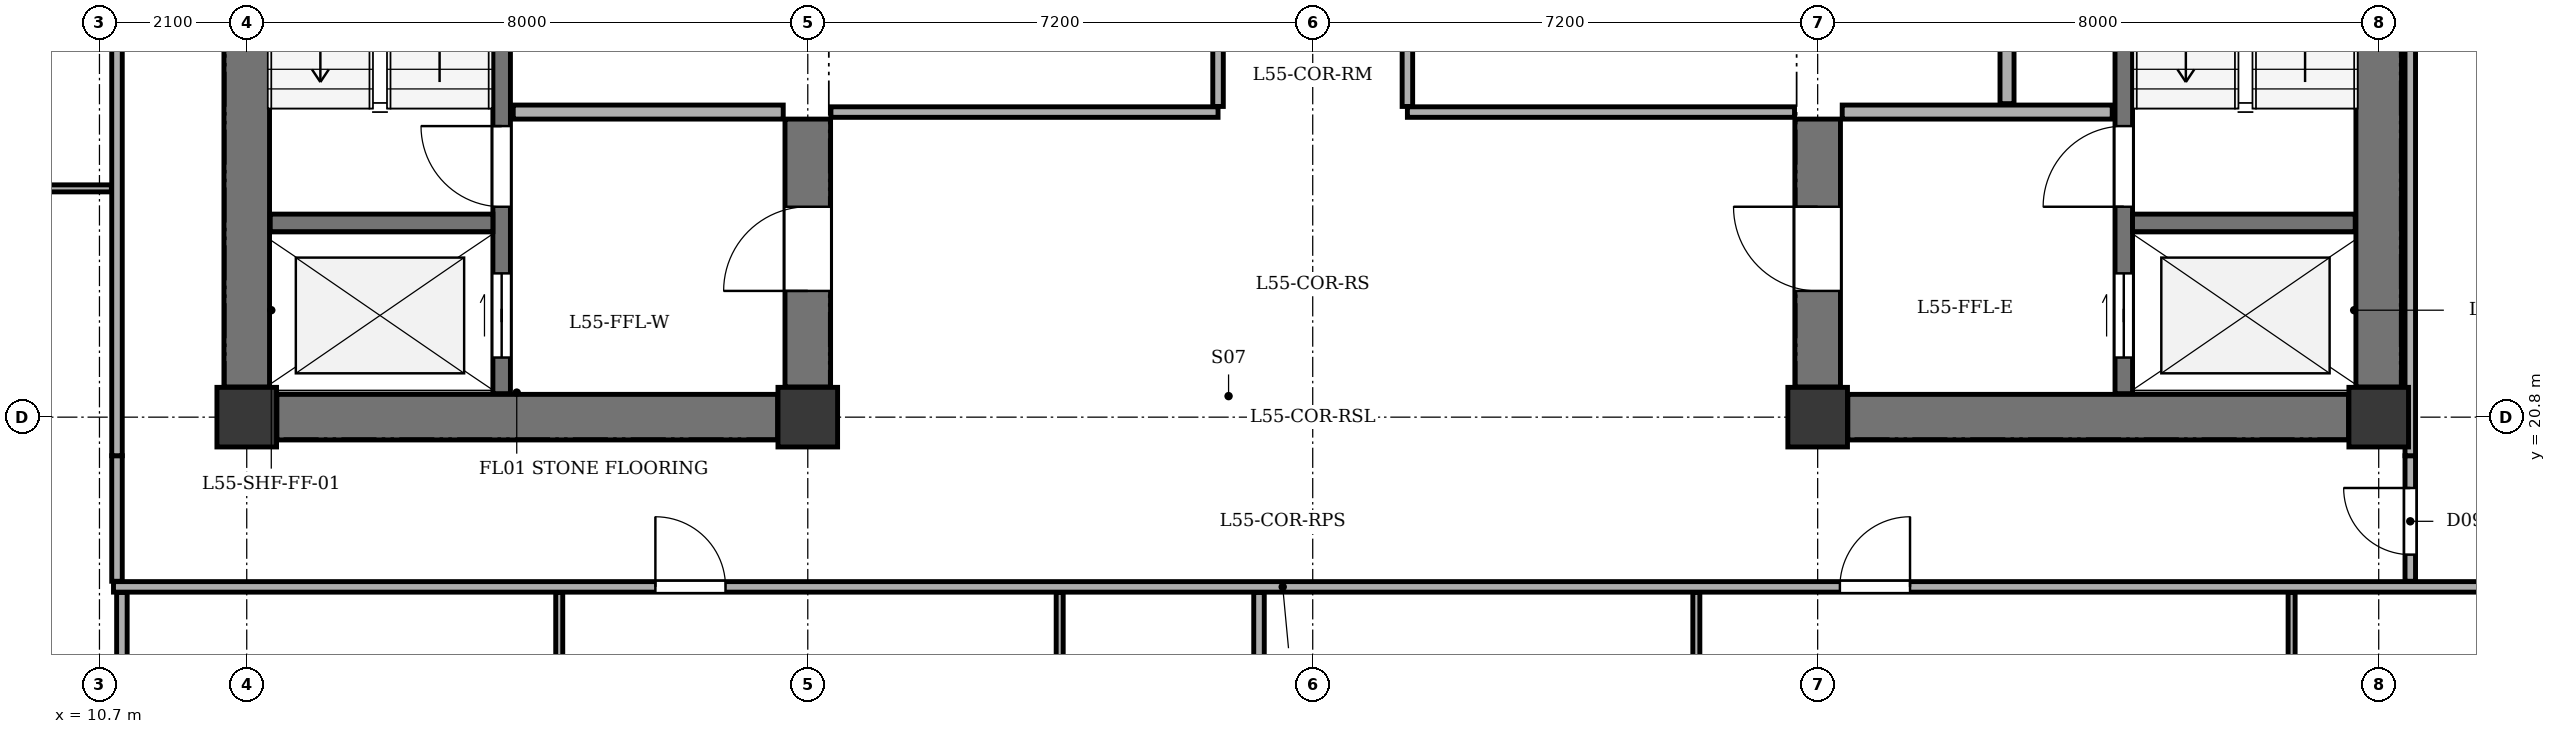
"""IFC4 building model, lengths in metres.
Left out: names, types, materials, properties, quantities, classifications, styles, units other than length and angle.
Written with IfcOpenShell. Run it as: python <this file> out.ifc"""

import sys

from ifc_helpers import new_model, si_unit, direction, frame, frame_2d, origin, origin_2d, place, context, subcontext, project, spatial, rectangle, extrude, element, fill, save


model = new_model("IFC4")
c1 = context("Model", 3, precision=1e-05, world=origin(), true_north=direction((0.0, 1.0)))
c2 = subcontext(c1, "Body", "Model", "MODEL_VIEW")
j1 = project(units=[si_unit("LENGTHUNIT", "METRE"), si_unit("PLANEANGLEUNIT", "RADIAN")], contexts=[c1])
p1 = place(None, origin())
s1 = spatial("IfcSite", under=j1, at=p1, CompositionType="ELEMENT")
p2 = place(p1, origin())
s2 = spatial("IfcBuilding", under=s1, at=p2, CompositionType="ELEMENT")
p3 = place(p2, frame((0.0, 0.0, 214.3)))
s3 = spatial("IfcBuildingStorey", under=s2, at=p3, CompositionType="ELEMENT", Elevation=214.3)
for number, where, z_axis, x_axis in (
    (1, (12.8, 20.8, 0.0), (0.0, 0.0, 1.0), (1.0, 0.0, 0.0)),
    (2, (20.8, 20.8, 0.0), (0.0, 0.0, 1.0), (1.0, 0.0, 0.0)),
    (3, (35.2, 20.8, 0.0), (0.0, 0.0, 1.0), (1.0, 0.0, 0.0)),
    (4, (43.2, 20.8, 0.0), (0.0, 0.0, 1.0), (1.0, 0.0, 0.0)),
):
    element("IfcColumn", number, at=place(p3, frame(where, z_axis=z_axis, x_axis=x_axis)), inside=s3, PredefinedType="COLUMN", context=c2, shape_type="SweptSolid", body=[
        extrude(rectangle(XDim=0.85, YDim=0.85, at=origin_2d()), origin(), (0.0, 0.0, 1.0), 3.4),
    ])
p4 = place(p3, frame((12.8, 21.23, 0.0), z_axis=(0.0, 0.0, 1.0), x_axis=(0.0, 1.0, 0.0)))
e5 = element("IfcWall", 5, at=p4, inside=s3, PredefinedType="SHEAR", context=c2, shape_type="SweptSolid", body=[
    extrude(rectangle(XDim=11.94, YDim=0.65, at=frame_2d((5.97, 0.0))), origin(), (0.0, 0.0, 1.0), 3.1),
])
p5 = place(p3, frame((13.23, 20.8, 0.0), z_axis=(0.0, 0.0, 1.0), x_axis=(1.0, 0.0, 0.0)))
e6 = element("IfcWall", 6, at=p5, inside=s3, PredefinedType="SHEAR", context=c2, shape_type="SweptSolid", body=[
    extrude(rectangle(XDim=7.14, YDim=0.65, at=frame_2d((3.57, 0.0))), origin(), (0.0, 0.0, 1.0), 3.1),
])
p6 = place(p3, frame((20.8, 21.23, 0.0), z_axis=(0.0, 0.0, 1.0), x_axis=(0.0, 1.0, 0.0)))
e7 = element("IfcWall", 7, at=p6, inside=s3, PredefinedType="SHEAR", context=c2, shape_type="SweptSolid", body=[
    extrude(rectangle(XDim=3.82, YDim=0.65, at=frame_2d((1.91, 0.0))), origin(), (0.0, 0.0, 1.0), 3.1),
])
p7 = place(p6, frame((1.37, 0.0, 0.0)))
e8 = element("IfcOpeningElement", 8, at=p7, cuts=e7, PredefinedType="OPENING", context=c2, shape_type="SweptSolid", body=[
    extrude(rectangle(XDim=1.2, YDim=2.15, at=frame_2d((0.6, 1.075))), frame((0.0, 0.335, 0.0), z_axis=(0.0, -1.0, 0.0), x_axis=(1.0, 0.0, 0.0)), (0.0, 0.0, 1.0), 0.67),
])
p8 = place(p3, frame((16.435, 21.135, 0.0), z_axis=(0.0, 0.0, 1.0), x_axis=(0.0, 1.0, 0.0)))
e9 = element("IfcWall", 9, at=p8, inside=s3, PredefinedType="SHEAR", context=c2, shape_type="SweptSolid", body=[
    extrude(rectangle(XDim=12.13, YDim=0.25, at=frame_2d((6.065, 0.0))), origin(), (0.0, 0.0, 1.0), 3.1),
])
p9 = place(p8, frame((0.515, 0.0, 0.0)))
e10 = element("IfcOpeningElement", 10, at=p9, cuts=e9, PredefinedType="OPENING", context=c2, shape_type="SweptSolid", body=[
    extrude(rectangle(XDim=1.2, YDim=2.15, at=frame_2d((0.6, 1.075))), frame((0.0, 0.135, 0.0), z_axis=(0.0, -1.0, 0.0), x_axis=(1.0, 0.0, 0.0)), (0.0, 0.0, 1.0), 0.27),
])
p10 = place(p8, frame((2.665, 0.0, 0.0)))
e11 = element("IfcOpeningElement", 11, at=p10, cuts=e9, PredefinedType="OPENING", context=c2, shape_type="SweptSolid", body=[
    extrude(rectangle(XDim=1.15, YDim=2.15, at=frame_2d((0.575, 1.075))), frame((0.0, 0.135, 0.0), z_axis=(0.0, -1.0, 0.0), x_axis=(1.0, 0.0, 0.0)), (0.0, 0.0, 1.0), 0.27),
])
p11 = place(p3, frame((13.135, 23.57, 0.0), z_axis=(0.0, 0.0, 1.0), x_axis=(1.0, 0.0, 0.0)))
e12 = element("IfcWall", 12, at=p11, inside=s3, PredefinedType="SHEAR", context=c2, shape_type="SweptSolid", body=[
    extrude(rectangle(XDim=3.175, YDim=0.25, at=frame_2d((1.587, 0.0))), origin(), (0.0, 0.0, 1.0), 3.1),
])
p12 = place(p3, frame((16.6, 25.15, 0.0), z_axis=(0.0, 0.0, 1.0), x_axis=(1.0, 0.0, 0.0)))
e13 = element("IfcWall", 13, at=p12, inside=s3, PredefinedType="SOLIDWALL", context=c2, shape_type="SweptSolid", body=[
    extrude(rectangle(XDim=3.85, YDim=0.2, at=frame_2d((1.925, 0.0))), origin(), (0.0, 0.0, 1.0), 3.1),
])
p13 = place(p3, frame((43.2, 21.23, 0.0), z_axis=(0.0, 0.0, 1.0), x_axis=(0.0, 1.0, 0.0)))
e14 = element("IfcWall", 14, at=p13, inside=s3, PredefinedType="SHEAR", context=c2, shape_type="SweptSolid", body=[
    extrude(rectangle(XDim=11.94, YDim=0.65, at=frame_2d((5.97, 0.0))), origin(), (0.0, 0.0, 1.0), 3.1),
])
p14 = place(p3, frame((35.63, 20.8, 0.0), z_axis=(0.0, 0.0, 1.0), x_axis=(1.0, 0.0, 0.0)))
e15 = element("IfcWall", 15, at=p14, inside=s3, PredefinedType="SHEAR", context=c2, shape_type="SweptSolid", body=[
    extrude(rectangle(XDim=7.14, YDim=0.65, at=frame_2d((3.57, 0.0))), origin(), (0.0, 0.0, 1.0), 3.1),
])
p15 = place(p3, frame((35.2, 21.23, 0.0), z_axis=(0.0, 0.0, 1.0), x_axis=(0.0, 1.0, 0.0)))
e16 = element("IfcWall", 16, at=p15, inside=s3, PredefinedType="SHEAR", context=c2, shape_type="SweptSolid", body=[
    extrude(rectangle(XDim=3.82, YDim=0.65, at=frame_2d((1.91, 0.0))), origin(), (0.0, 0.0, 1.0), 3.1),
])
p16 = place(p15, frame((1.37, 0.0, 0.0)))
e17 = element("IfcOpeningElement", 17, at=p16, cuts=e16, PredefinedType="OPENING", context=c2, shape_type="SweptSolid", body=[
    extrude(rectangle(XDim=1.2, YDim=2.15, at=frame_2d((0.6, 1.075))), frame((0.0, 0.335, 0.0), z_axis=(0.0, -1.0, 0.0), x_axis=(1.0, 0.0, 0.0)), (0.0, 0.0, 1.0), 0.67),
])
p17 = place(p3, frame((39.565, 21.135, 0.0), z_axis=(0.0, 0.0, 1.0), x_axis=(0.0, 1.0, 0.0)))
e18 = element("IfcWall", 18, at=p17, inside=s3, PredefinedType="SHEAR", context=c2, shape_type="SweptSolid", body=[
    extrude(rectangle(XDim=12.13, YDim=0.25, at=frame_2d((6.065, 0.0))), origin(), (0.0, 0.0, 1.0), 3.1),
])
p18 = place(p17, frame((0.515, 0.0, 0.0)))
e19 = element("IfcOpeningElement", 19, at=p18, cuts=e18, PredefinedType="OPENING", context=c2, shape_type="SweptSolid", body=[
    extrude(rectangle(XDim=1.2, YDim=2.15, at=frame_2d((0.6, 1.075))), frame((0.0, 0.135, 0.0), z_axis=(0.0, -1.0, 0.0), x_axis=(1.0, 0.0, 0.0)), (0.0, 0.0, 1.0), 0.27),
])
p19 = place(p17, frame((2.665, 0.0, 0.0)))
e20 = element("IfcOpeningElement", 20, at=p19, cuts=e18, PredefinedType="OPENING", context=c2, shape_type="SweptSolid", body=[
    extrude(rectangle(XDim=1.15, YDim=2.15, at=frame_2d((0.575, 1.075))), frame((0.0, 0.135, 0.0), z_axis=(0.0, -1.0, 0.0), x_axis=(1.0, 0.0, 0.0)), (0.0, 0.0, 1.0), 0.27),
])
p20 = place(p3, frame((39.69, 23.57, 0.0), z_axis=(0.0, 0.0, 1.0), x_axis=(1.0, 0.0, 0.0)))
e21 = element("IfcWall", 21, at=p20, inside=s3, PredefinedType="SHEAR", context=c2, shape_type="SweptSolid", body=[
    extrude(rectangle(XDim=3.175, YDim=0.25, at=frame_2d((1.587, 0.0))), origin(), (0.0, 0.0, 1.0), 3.1),
])
p21 = place(p3, frame((35.55, 25.15, 0.0), z_axis=(0.0, 0.0, 1.0), x_axis=(1.0, 0.0, 0.0)))
e22 = element("IfcWall", 22, at=p21, inside=s3, PredefinedType="SOLIDWALL", context=c2, shape_type="SweptSolid", body=[
    extrude(rectangle(XDim=3.85, YDim=0.2, at=frame_2d((1.925, 0.0))), origin(), (0.0, 0.0, 1.0), 3.1),
])
p22 = place(p3, frame((37.9, 25.27, 0.0), z_axis=(0.0, 0.0, 1.0), x_axis=(0.0, 1.0, 0.0)))
e23 = element("IfcWall", 23, at=p22, inside=s3, PredefinedType="SOLIDWALL", context=c2, shape_type="SweptSolid", body=[
    extrude(rectangle(XDim=7.995, YDim=0.2, at=frame_2d((3.998, 0.0))), origin(), (0.0, 0.0, 1.0), 3.1),
])
for number, where, z_axis, x_axis in (
    (24, (21.13, 25.15, 0.0), (0.0, 0.0, 1.0), (1.0, 0.0, 0.0)),
    (25, (29.35, 25.15, 0.0), (0.0, 0.0, 1.0), (1.0, 0.0, 0.0)),
):
    element("IfcWall", number, at=place(p3, frame(where, z_axis=z_axis, x_axis=x_axis)), inside=s3, PredefinedType="PARTITIONING", context=c2, shape_type="SweptSolid", body=[
        extrude(rectangle(XDim=5.52, YDim=0.15, at=frame_2d((2.76, 0.0))), origin(), (0.0, 0.0, 1.0), 3.1),
    ])
p23 = place(p3, frame((26.65, 25.23, 0.0), z_axis=(0.0, 0.0, 1.0), x_axis=(0.0, 1.0, 0.0)))
e26 = element("IfcWall", 26, at=p23, inside=s3, PredefinedType="PARTITIONING", context=c2, shape_type="SweptSolid", body=[
    extrude(rectangle(XDim=5.82, YDim=0.15, at=frame_2d((2.91, 0.0))), origin(), (0.0, 0.0, 1.0), 3.1),
])
p24 = place(p23, frame((2.72, 0.0, 0.0)))
e27 = element("IfcOpeningElement", 27, at=p24, cuts=e26, PredefinedType="OPENING", context=c2, shape_type="SweptSolid", body=[
    extrude(rectangle(XDim=1.0, YDim=2.1, at=frame_2d((0.5, 1.05))), frame((0.0, 0.085, 0.0), z_axis=(0.0, -1.0, 0.0), x_axis=(1.0, 0.0, 0.0)), (0.0, 0.0, 1.0), 0.17),
])
p25 = place(p3, frame((29.35, 25.23, 0.0), z_axis=(0.0, 0.0, 1.0), x_axis=(0.0, 1.0, 0.0)))
e28 = element("IfcWall", 28, at=p25, inside=s3, PredefinedType="PARTITIONING", context=c2, shape_type="SweptSolid", body=[
    extrude(rectangle(XDim=5.82, YDim=0.15, at=frame_2d((2.91, 0.0))), origin(), (0.0, 0.0, 1.0), 3.1),
])
p26 = place(p25, frame((2.72, 0.0, 0.0)))
e29 = element("IfcOpeningElement", 29, at=p26, cuts=e28, PredefinedType="OPENING", context=c2, shape_type="SweptSolid", body=[
    extrude(rectangle(XDim=1.0, YDim=2.1, at=frame_2d((0.5, 1.05))), frame((0.0, 0.085, 0.0), z_axis=(0.0, -1.0, 0.0), x_axis=(1.0, 0.0, 0.0)), (0.0, 0.0, 1.0), 0.17),
])
p27 = place(p3, frame((10.9, 18.38, 0.0), z_axis=(0.0, 0.0, 1.0), x_axis=(1.0, 0.0, 0.0)))
e30 = element("IfcWall", 30, at=p27, inside=s3, PredefinedType="PARTITIONING", context=c2, shape_type="SweptSolid", body=[
    extrude(rectangle(XDim=34.02, YDim=0.15, at=frame_2d((17.01, 0.0))), origin(), (0.0, 0.0, 1.0), 3.1),
])
p28 = place(p27, frame((7.727, 0.0, 0.0)))
e31 = element("IfcOpeningElement", 31, at=p28, cuts=e30, PredefinedType="OPENING", context=c2, shape_type="SweptSolid", body=[
    extrude(rectangle(XDim=1.0, YDim=2.1, at=frame_2d((0.5, 1.05))), frame((0.0, 0.085, 0.0), z_axis=(0.0, -1.0, 0.0), x_axis=(1.0, 0.0, 0.0)), (0.0, 0.0, 1.0), 0.17),
])
p29 = place(p27, frame((24.617, 0.0, 0.0)))
e32 = element("IfcOpeningElement", 32, at=p29, cuts=e30, PredefinedType="OPENING", context=c2, shape_type="SweptSolid", body=[
    extrude(rectangle(XDim=1.0, YDim=2.1, at=frame_2d((0.5, 1.05))), frame((0.0, 0.085, 0.0), z_axis=(0.0, -1.0, 0.0), x_axis=(1.0, 0.0, 0.0)), (0.0, 0.0, 1.0), 0.17),
])
p30 = place(p3, frame((11.02, 3.045, 0.0), z_axis=(0.0, 0.0, 1.0), x_axis=(0.0, 1.0, 0.0)))
e33 = element("IfcWall", 33, at=p30, inside=s3, PredefinedType="PARTITIONING", context=c2, shape_type="SweptSolid", body=[
    extrude(rectangle(XDim=15.255, YDim=0.15, at=frame_2d((7.627, 0.0))), origin(), (0.0, 0.0, 1.0), 3.1),
])
p31 = place(p3, frame((24.392, 5.605, 0.0), z_axis=(0.0, 0.0, 1.0), x_axis=(0.0, 1.0, 0.0)))
e34 = element("IfcWall", 34, at=p31, inside=s3, PredefinedType="PARTITIONING", context=c2, shape_type="SweptSolid", body=[
    extrude(rectangle(XDim=12.695, YDim=0.1, at=frame_2d((6.348, 0.0))), origin(), (0.0, 0.0, 1.0), 3.1),
])
p32 = place(p31, frame((5.91, 0.0, 0.0)))
e35 = element("IfcOpeningElement", 35, at=p32, cuts=e34, PredefinedType="OPENING", context=c2, shape_type="SweptSolid", body=[
    extrude(rectangle(XDim=0.9, YDim=2.05, at=frame_2d((0.45, 1.025))), frame((0.0, 0.06, 0.0), z_axis=(0.0, -1.0, 0.0), x_axis=(1.0, 0.0, 0.0)), (0.0, 0.0, 1.0), 0.12),
])
p33 = place(p3, frame((17.256, 5.605, 0.0), z_axis=(0.0, 0.0, 1.0), x_axis=(0.0, 1.0, 0.0)))
e36 = element("IfcWall", 36, at=p33, inside=s3, PredefinedType="PARTITIONING", context=c2, shape_type="SweptSolid", body=[
    extrude(rectangle(XDim=12.695, YDim=0.1, at=frame_2d((6.348, 0.0))), origin(), (0.0, 0.0, 1.0), 3.1),
])
p34 = place(p33, frame((0.605, 0.0, 0.0)))
e37 = element("IfcOpeningElement", 37, at=p34, cuts=e36, PredefinedType="OPENING", context=c2, shape_type="SweptSolid", body=[
    extrude(rectangle(XDim=0.9, YDim=2.05, at=frame_2d((0.45, 1.025))), frame((0.0, 0.06, 0.0), z_axis=(0.0, -1.0, 0.0), x_axis=(1.0, 0.0, 0.0)), (0.0, 0.0, 1.0), 0.12),
])
p35 = place(p3, frame((27.234, 3.045, 0.0), z_axis=(0.0, 0.0, 1.0), x_axis=(0.0, 1.0, 0.0)))
e38 = element("IfcWall", 38, at=p35, inside=s3, PredefinedType="PARTITIONING", context=c2, shape_type="SweptSolid", body=[
    extrude(rectangle(XDim=15.255, YDim=0.15, at=frame_2d((7.627, 0.0))), origin(), (0.0, 0.0, 1.0), 3.1),
])
p36 = place(p3, frame((41.958, 5.605, 0.0), z_axis=(0.0, 0.0, 1.0), x_axis=(0.0, 1.0, 0.0)))
e39 = element("IfcWall", 39, at=p36, inside=s3, PredefinedType="PARTITIONING", context=c2, shape_type="SweptSolid", body=[
    extrude(rectangle(XDim=12.695, YDim=0.1, at=frame_2d((6.348, 0.0))), origin(), (0.0, 0.0, 1.0), 2.725),
])
p37 = place(p36, frame((5.91, 0.0, 0.0)))
e40 = element("IfcOpeningElement", 40, at=p37, cuts=e39, PredefinedType="OPENING", context=c2, shape_type="SweptSolid", body=[
    extrude(rectangle(XDim=0.9, YDim=2.05, at=frame_2d((0.45, 1.025))), frame((0.0, 0.06, 0.0), z_axis=(0.0, -1.0, 0.0), x_axis=(1.0, 0.0, 0.0)), (0.0, 0.0, 1.0), 0.12),
])
p38 = place(p3, frame((33.47, 5.605, 0.0), z_axis=(0.0, 0.0, 1.0), x_axis=(0.0, 1.0, 0.0)))
e41 = element("IfcWall", 41, at=p38, inside=s3, PredefinedType="PARTITIONING", context=c2, shape_type="SweptSolid", body=[
    extrude(rectangle(XDim=12.695, YDim=0.1, at=frame_2d((6.348, 0.0))), origin(), (0.0, 0.0, 1.0), 2.725),
])
p39 = place(p38, frame((0.605, 0.0, 0.0)))
e42 = element("IfcOpeningElement", 42, at=p39, cuts=e41, PredefinedType="OPENING", context=c2, shape_type="SweptSolid", body=[
    extrude(rectangle(XDim=0.9, YDim=2.05, at=frame_2d((0.45, 1.025))), frame((0.0, 0.06, 0.0), z_axis=(0.0, -1.0, 0.0), x_axis=(1.0, 0.0, 0.0)), (0.0, 0.0, 1.0), 0.12),
])
p40 = place(p3, frame((10.95, 18.46, 0.0), z_axis=(0.0, 0.0, 1.0), x_axis=(0.0, 1.0, 0.0)))
e43 = element("IfcWall", 43, at=p40, inside=s3, PredefinedType="PARTITIONING", context=c2, shape_type="SweptSolid", body=[
    extrude(rectangle(XDim=1.79, YDim=0.15, at=frame_2d((0.895, 0.0))), origin(), (0.0, 0.0, 1.0), 3.1),
])
p41 = place(p3, frame((10.95, 20.25, 0.0), z_axis=(0.0, 0.0, 1.0), x_axis=(0.0, 1.0, 0.0)))
e44 = element("IfcWall", 44, at=p41, inside=s3, PredefinedType="PARTITIONING", context=c2, shape_type="SweptSolid", body=[
    extrude(rectangle(XDim=13.9, YDim=0.15, at=frame_2d((6.95, 0.0))), origin(), (0.0, 0.0, 1.0), 3.1),
])
p42 = place(p3, frame((4.645, 24.062, 0.0), z_axis=(0.0, 0.0, 1.0), x_axis=(1.0, 0.0, 0.0)))
e45 = element("IfcWall", 45, at=p42, inside=s3, PredefinedType="PARTITIONING", context=c2, shape_type="SweptSolid", body=[
    extrude(rectangle(XDim=6.225, YDim=0.1, at=frame_2d((3.113, 0.0))), origin(), (0.0, 0.0, 1.0), 3.1),
])
p43 = place(p42, frame((2.696, 0.0, 0.0)))
e46 = element("IfcOpeningElement", 46, at=p43, cuts=e45, PredefinedType="OPENING", context=c2, shape_type="SweptSolid", body=[
    extrude(rectangle(XDim=0.9, YDim=2.05, at=frame_2d((0.45, 1.025))), frame((0.0, 0.06, 0.0), z_axis=(0.0, -1.0, 0.0), x_axis=(1.0, 0.0, 0.0)), (0.0, 0.0, 1.0), 0.12),
])
p44 = place(p3, frame((43.65, 18.46, 0.0), z_axis=(0.0, 0.0, 1.0), x_axis=(0.0, 1.0, 0.0)))
e47 = element("IfcWall", 47, at=p44, inside=s3, PredefinedType="PARTITIONING", context=c2, shape_type="SweptSolid", body=[
    extrude(rectangle(XDim=1.79, YDim=0.15, at=frame_2d((0.895, 0.0))), origin(), (0.0, 0.0, 1.0), 3.1),
])
p45 = place(p44, frame((0.38, 0.0, 0.0)))
e48 = element("IfcOpeningElement", 48, at=p45, cuts=e47, PredefinedType="OPENING", context=c2, shape_type="SweptSolid", body=[
    extrude(rectangle(XDim=0.95, YDim=2.1, at=frame_2d((0.475, 1.05))), frame((0.0, 0.085, 0.0), z_axis=(0.0, -1.0, 0.0), x_axis=(1.0, 0.0, 0.0)), (0.0, 0.0, 1.0), 0.17),
])
p46 = place(p3, frame((43.65, 20.25, 0.0), z_axis=(0.0, 0.0, 1.0), x_axis=(0.0, 1.0, 0.0)))
e49 = element("IfcWall", 49, at=p46, inside=s3, PredefinedType="PARTITIONING", context=c2, shape_type="SweptSolid", body=[
    extrude(rectangle(XDim=13.27, YDim=0.15, at=frame_2d((6.635, 0.0))), origin(), (0.0, 0.0, 1.0), 3.1),
])
p47 = place(p7, origin())
e50 = element("IfcDoor", 50, at=p47, inside=s3, OperationType="SINGLE_SWING_LEFT", PredefinedType="DOOR", context=c2, shape_type="SweptSolid", body=[
    extrude(rectangle(XDim=1.2, YDim=2.15, at=frame_2d((0.6, 1.075))), frame((0.0, 0.025, 0.0), z_axis=(0.0, -1.0, 0.0), x_axis=(1.0, 0.0, 0.0)), (0.0, 0.0, 1.0), 0.05),
])
fill(e8, e50)
p48 = place(p9, origin())
e51 = element("IfcDoor", 51, at=p48, inside=s3, OperationType="DOUBLE_DOOR_SLIDING", PredefinedType="DOOR", context=c2, shape_type="SweptSolid", body=[
    extrude(rectangle(XDim=1.2, YDim=2.15, at=frame_2d((0.6, 1.075))), frame((0.0, 0.025, 0.0), z_axis=(0.0, -1.0, 0.0), x_axis=(1.0, 0.0, 0.0)), (0.0, 0.0, 1.0), 0.05),
])
fill(e10, e51)
p49 = place(p10, origin())
e52 = element("IfcDoor", 52, at=p49, inside=s3, OperationType="SINGLE_SWING_RIGHT", PredefinedType="DOOR", context=c2, shape_type="SweptSolid", body=[
    extrude(rectangle(XDim=1.15, YDim=2.15, at=frame_2d((0.575, 1.075))), frame((0.0, 0.025, 0.0), z_axis=(0.0, -1.0, 0.0), x_axis=(1.0, 0.0, 0.0)), (0.0, 0.0, 1.0), 0.05),
])
fill(e11, e52)
p50 = place(p16, origin())
e53 = element("IfcDoor", 53, at=p50, inside=s3, OperationType="SINGLE_SWING_RIGHT", PredefinedType="DOOR", context=c2, shape_type="SweptSolid", body=[
    extrude(rectangle(XDim=1.2, YDim=2.15, at=frame_2d((0.6, 1.075))), frame((0.0, 0.025, 0.0), z_axis=(0.0, -1.0, 0.0), x_axis=(1.0, 0.0, 0.0)), (0.0, 0.0, 1.0), 0.05),
])
fill(e17, e53)
p51 = place(p18, origin())
e54 = element("IfcDoor", 54, at=p51, inside=s3, OperationType="DOUBLE_DOOR_SLIDING", PredefinedType="DOOR", context=c2, shape_type="SweptSolid", body=[
    extrude(rectangle(XDim=1.2, YDim=2.15, at=frame_2d((0.6, 1.075))), frame((0.0, 0.025, 0.0), z_axis=(0.0, -1.0, 0.0), x_axis=(1.0, 0.0, 0.0)), (0.0, 0.0, 1.0), 0.05),
])
fill(e19, e54)
p52 = place(p19, origin())
e55 = element("IfcDoor", 55, at=p52, inside=s3, OperationType="SINGLE_SWING_LEFT", PredefinedType="DOOR", context=c2, shape_type="SweptSolid", body=[
    extrude(rectangle(XDim=1.15, YDim=2.15, at=frame_2d((0.575, 1.075))), frame((0.0, 0.025, 0.0), z_axis=(0.0, -1.0, 0.0), x_axis=(1.0, 0.0, 0.0)), (0.0, 0.0, 1.0), 0.05),
])
fill(e20, e55)
p53 = place(p28, origin())
e56 = element("IfcDoor", 56, at=p53, inside=s3, OperationType="SINGLE_SWING_LEFT", PredefinedType="DOOR", context=c2, shape_type="SweptSolid", body=[
    extrude(rectangle(XDim=1.0, YDim=2.1, at=frame_2d((0.5, 1.05))), frame((0.0, 0.025, 0.0), z_axis=(0.0, -1.0, 0.0), x_axis=(1.0, 0.0, 0.0)), (0.0, 0.0, 1.0), 0.05),
])
fill(e31, e56)
p54 = place(p29, origin())
e57 = element("IfcDoor", 57, at=p54, inside=s3, OperationType="SINGLE_SWING_RIGHT", PredefinedType="DOOR", context=c2, shape_type="SweptSolid", body=[
    extrude(rectangle(XDim=1.0, YDim=2.1, at=frame_2d((0.5, 1.05))), frame((0.0, 0.025, 0.0), z_axis=(0.0, -1.0, 0.0), x_axis=(1.0, 0.0, 0.0)), (0.0, 0.0, 1.0), 0.05),
])
fill(e32, e57)
p55 = place(p45, origin())
e58 = element("IfcDoor", 58, at=p55, inside=s3, OperationType="SINGLE_SWING_RIGHT", PredefinedType="DOOR", context=c2, shape_type="SweptSolid", body=[
    extrude(rectangle(XDim=0.95, YDim=2.1, at=frame_2d((0.475, 1.05))), frame((0.0, 0.025, 0.0), z_axis=(0.0, -1.0, 0.0), x_axis=(1.0, 0.0, 0.0)), (0.0, 0.0, 1.0), 0.05),
])
fill(e48, e58)
save(model, sys.argv[1])
